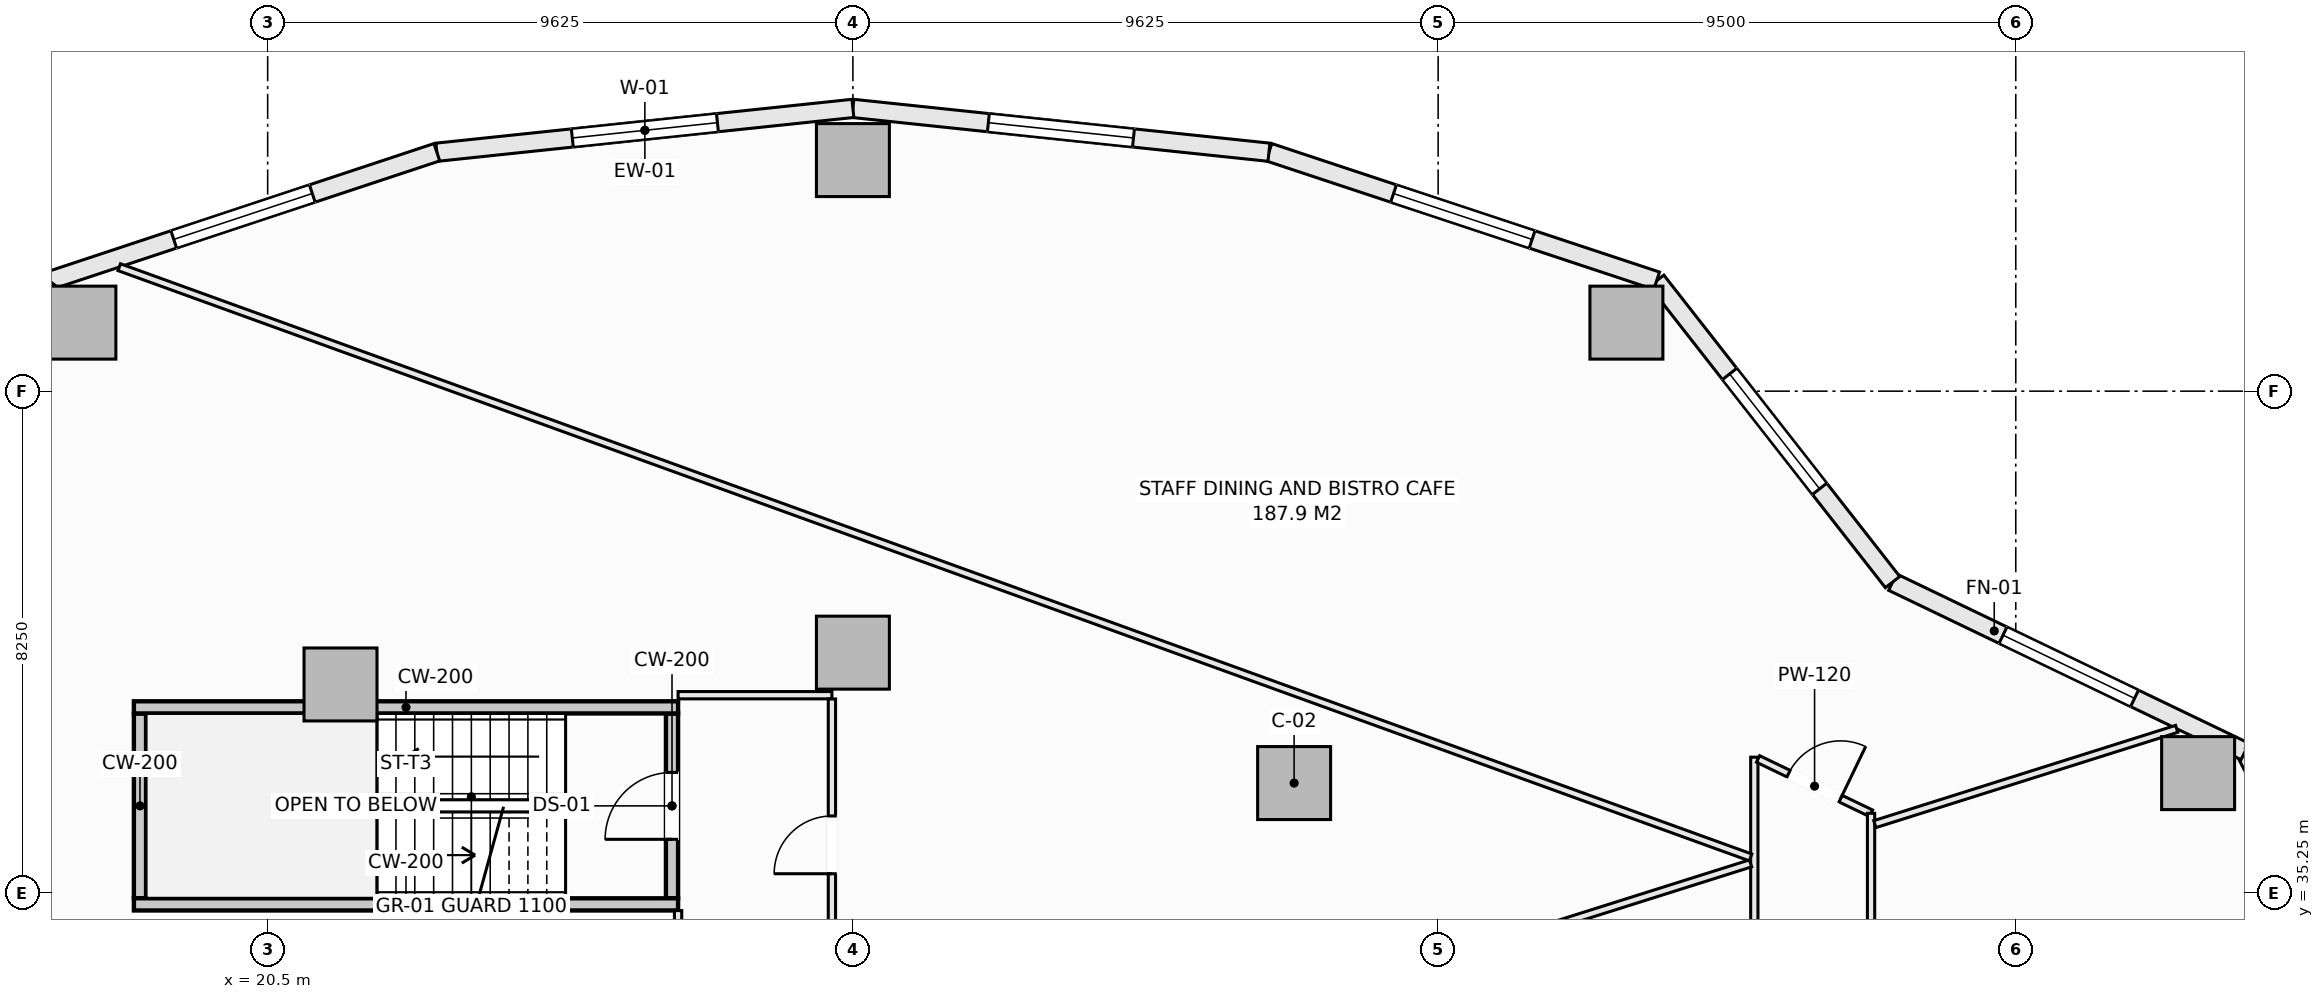
"""IFC4 building model, lengths in metres.
Left out: names, types, materials, properties, quantities, classifications, styles, units other than length and angle.
Written with IfcOpenShell. Run it as: python <this file> out.ifc"""

import sys

from ifc_helpers import new_model, si_unit, direction, frame, frame_2d, origin, origin_2d, place, context, subcontext, project, spatial, rectangle, extrude, element, fill, save


model = new_model("IFC4")
c1 = context("Model", 3, precision=1e-05, world=origin(), true_north=direction((0.0, 1.0)))
c2 = subcontext(c1, "Body", "Model", "MODEL_VIEW")
j1 = project(units=[si_unit("LENGTHUNIT", "METRE"), si_unit("PLANEANGLEUNIT", "RADIAN")], contexts=[c1])
p1 = place(None, origin())
s1 = spatial("IfcSite", under=j1, at=p1, CompositionType="ELEMENT")
p2 = place(p1, origin())
s2 = spatial("IfcBuilding", under=s1, at=p2, CompositionType="ELEMENT")
p3 = place(p2, frame((0.0, 0.0, 80.4)))
s3 = spatial("IfcBuildingStorey", under=s2, at=p3, CompositionType="ELEMENT", Elevation=80.4)
for number, where, z_axis, x_axis in (
    (1, (52.249, 37.219, -0.28), (0.0, 0.0, 1.0), (1.0, 0.0, 0.0)),
    (2, (42.846, 44.627, -0.28), (0.0, 0.0, 1.0), (1.0, 0.0, 0.0)),
    (3, (30.125, 47.3, -0.28), (0.0, 0.0, 1.0), (1.0, 0.0, 0.0)),
    (4, (17.404, 44.627, -0.28), (0.0, 0.0, 1.0), (1.0, 0.0, 0.0)),
    (5, (37.382, 37.055, -0.28), (0.0, 0.0, 1.0), (1.0, 0.0, 0.0)),
    (6, (30.125, 39.2, -0.28), (0.0, 0.0, 1.0), (1.0, 0.0, 0.0)),
    (7, (21.698, 38.677, -0.28), (0.0, 0.0, 1.0), (1.0, 0.0, 0.0)),
):
    element("IfcColumn", number, at=place(p3, frame(where, z_axis=z_axis, x_axis=x_axis)), inside=s3, PredefinedType="COLUMN", context=c2, shape_type="SweptSolid", body=[
        extrude(rectangle(XDim=1.2, YDim=1.2, at=origin_2d()), origin(), (0.0, 0.0, 1.0), 3.85),
    ])
p4 = place(p3, frame((53.021, 37.575, 0.0), z_axis=(0.0, 0.0, 1.0), x_axis=(0.459800981414, -0.888021991558, 0.0)))
e8 = element("IfcWall", 8, at=p4, inside=s3, PredefinedType="SOLIDWALL", context=c2, shape_type="SweptSolid", body=[
    extrude(rectangle(XDim=5.744, YDim=0.3, at=frame_2d((2.872, 0.0))), origin(), (0.0, 0.0, 1.0), 3.093),
])
p5 = place(p4, frame((1.672, 0.0, 0.85)))
e9 = element("IfcOpeningElement", 9, at=p5, cuts=e8, PredefinedType="OPENING", context=c2, shape_type="SweptSolid", body=[
    extrude(rectangle(XDim=2.4, YDim=1.9, at=frame_2d((1.2, 0.95))), frame((0.0, 0.16, 0.0), z_axis=(0.0, -1.0, 0.0), x_axis=(1.0, 0.0, 0.0)), (0.0, 0.0, 1.0), 0.32),
])
p6 = place(p3, frame((47.224, 40.36, 0.0), z_axis=(0.0, 0.0, 1.0), x_axis=(0.901354747727, -0.433081538224, 0.0)))
e10 = element("IfcWall", 10, at=p6, inside=s3, PredefinedType="SOLIDWALL", context=c2, shape_type="SweptSolid", body=[
    extrude(rectangle(XDim=6.431, YDim=0.3, at=frame_2d((3.215, 0.0))), origin(), (0.0, 0.0, 1.0), 3.093),
])
p7 = place(p6, frame((2.015, 0.0, 0.85)))
e11 = element("IfcOpeningElement", 11, at=p7, cuts=e10, PredefinedType="OPENING", context=c2, shape_type="SweptSolid", body=[
    extrude(rectangle(XDim=2.4, YDim=1.9, at=frame_2d((1.2, 0.95))), frame((0.0, 0.16, 0.0), z_axis=(0.0, -1.0, 0.0), x_axis=(1.0, 0.0, 0.0)), (0.0, 0.0, 1.0), 0.32),
])
p8 = place(p3, frame((43.344, 45.316, 0.0), z_axis=(0.0, 0.0, 1.0), x_axis=(0.616434798832, -0.78740595552, 0.0)))
e12 = element("IfcWall", 12, at=p8, inside=s3, PredefinedType="SOLIDWALL", context=c2, shape_type="SweptSolid", body=[
    extrude(rectangle(XDim=6.294, YDim=0.3, at=frame_2d((3.147, 0.0))), origin(), (0.0, 0.0, 1.0), 3.093),
])
p9 = place(p8, frame((1.947, 0.0, 0.85)))
e13 = element("IfcOpeningElement", 13, at=p9, cuts=e12, PredefinedType="OPENING", context=c2, shape_type="SweptSolid", body=[
    extrude(rectangle(XDim=2.4, YDim=1.9, at=frame_2d((1.2, 0.95))), frame((0.0, 0.16, 0.0), z_axis=(0.0, -1.0, 0.0), x_axis=(1.0, 0.0, 0.0)), (0.0, 0.0, 1.0), 0.32),
])
p10 = place(p3, frame((36.968, 47.429, 0.0), z_axis=(0.0, 0.0, 1.0), x_axis=(0.949245153629, -0.314537181127, 0.0)))
e14 = element("IfcWall", 14, at=p10, inside=s3, PredefinedType="SOLIDWALL", context=c2, shape_type="SweptSolid", body=[
    extrude(rectangle(XDim=6.717, YDim=0.3, at=frame_2d((3.358, 0.0))), origin(), (0.0, 0.0, 1.0), 3.093),
])
p11 = place(p10, frame((2.159, 0.0, 0.85)))
e15 = element("IfcOpeningElement", 15, at=p11, cuts=e14, PredefinedType="OPENING", context=c2, shape_type="SweptSolid", body=[
    extrude(rectangle(XDim=2.4, YDim=1.9, at=frame_2d((1.2, 0.95))), frame((0.0, 0.16, 0.0), z_axis=(0.0, -1.0, 0.0), x_axis=(1.0, 0.0, 0.0)), (0.0, 0.0, 1.0), 0.32),
])
p12 = place(p3, frame((30.125, 48.15, 0.0), z_axis=(0.0, 0.0, 1.0), x_axis=(0.994498840295, -0.104747585419, 0.0)))
e16 = element("IfcWall", 16, at=p12, inside=s3, PredefinedType="SOLIDWALL", context=c2, shape_type="SweptSolid", body=[
    extrude(rectangle(XDim=6.88, YDim=0.3, at=frame_2d((3.44, 0.0))), origin(), (0.0, 0.0, 1.0), 3.093),
])
p13 = place(p12, frame((2.24, 0.0, 0.85)))
e17 = element("IfcOpeningElement", 17, at=p13, cuts=e16, PredefinedType="OPENING", context=c2, shape_type="SweptSolid", body=[
    extrude(rectangle(XDim=2.4, YDim=1.9, at=frame_2d((1.2, 0.95))), frame((0.0, 0.16, 0.0), z_axis=(0.0, -1.0, 0.0), x_axis=(1.0, 0.0, 0.0)), (0.0, 0.0, 1.0), 0.32),
])
p14 = place(p3, frame((23.282, 47.429, 0.0), z_axis=(0.0, 0.0, 1.0), x_axis=(0.994498840295, 0.104747585419, 0.0)))
e18 = element("IfcWall", 18, at=p14, inside=s3, PredefinedType="SOLIDWALL", context=c2, shape_type="SweptSolid", body=[
    extrude(rectangle(XDim=6.88, YDim=0.3, at=frame_2d((3.44, 0.0))), origin(), (0.0, 0.0, 1.0), 3.093),
])
p15 = place(p14, frame((2.24, 0.0, 0.85)))
e19 = element("IfcOpeningElement", 19, at=p15, cuts=e18, PredefinedType="OPENING", context=c2, shape_type="SweptSolid", body=[
    extrude(rectangle(XDim=2.4, YDim=1.9, at=frame_2d((1.2, 0.95))), frame((0.0, 0.16, 0.0), z_axis=(0.0, -1.0, 0.0), x_axis=(1.0, 0.0, 0.0)), (0.0, 0.0, 1.0), 0.32),
])
p16 = place(p3, frame((16.906, 45.316, 0.0), z_axis=(0.0, 0.0, 1.0), x_axis=(0.949245153629, 0.314537181127, 0.0)))
e20 = element("IfcWall", 20, at=p16, inside=s3, PredefinedType="SOLIDWALL", context=c2, shape_type="SweptSolid", body=[
    extrude(rectangle(XDim=6.717, YDim=0.3, at=frame_2d((3.358, 0.0))), origin(), (0.0, 0.0, 1.0), 3.093),
])
p17 = place(p16, frame((2.159, 0.0, 0.85)))
e21 = element("IfcOpeningElement", 21, at=p17, cuts=e20, PredefinedType="OPENING", context=c2, shape_type="SweptSolid", body=[
    extrude(rectangle(XDim=2.4, YDim=1.9, at=frame_2d((1.2, 0.95))), frame((0.0, 0.16, 0.0), z_axis=(0.0, -1.0, 0.0), x_axis=(1.0, 0.0, 0.0)), (0.0, 0.0, 1.0), 0.32),
])
p18 = place(p3, frame((13.026, 40.36, 0.0), z_axis=(0.0, 0.0, 1.0), x_axis=(0.616434798832, 0.78740595552, 0.0)))
e22 = element("IfcWall", 22, at=p18, inside=s3, PredefinedType="SOLIDWALL", context=c2, shape_type="SweptSolid", body=[
    extrude(rectangle(XDim=6.294, YDim=0.3, at=frame_2d((3.147, 0.0))), origin(), (0.0, 0.0, 1.0), 3.093),
])
p19 = place(p18, frame((1.947, 0.0, 0.85)))
e23 = element("IfcOpeningElement", 23, at=p19, cuts=e22, PredefinedType="OPENING", context=c2, shape_type="SweptSolid", body=[
    extrude(rectangle(XDim=2.4, YDim=1.9, at=frame_2d((1.2, 0.95))), frame((0.0, 0.16, 0.0), z_axis=(0.0, -1.0, 0.0), x_axis=(1.0, 0.0, 0.0)), (0.0, 0.0, 1.0), 0.32),
])
p20 = place(p3, frame((27.15, 35.16, -0.28), z_axis=(0.0, 0.0, 1.0), x_axis=(0.0, 1.0, 0.0)))
e24 = element("IfcWall", 24, at=p20, inside=s3, PredefinedType="SHEAR", context=c2, shape_type="SweptSolid", body=[
    extrude(rectangle(XDim=3.04, YDim=0.2, at=frame_2d((1.52, 0.0))), origin(), (0.0, 0.0, 1.0), 3.85),
])
p21 = place(p20, frame((0.97, 0.0, 0.28)))
e25 = element("IfcOpeningElement", 25, at=p21, cuts=e24, PredefinedType="OPENING", context=c2, shape_type="SweptSolid", body=[
    extrude(rectangle(XDim=1.1, YDim=2.15, at=frame_2d((0.55, 1.075))), frame((0.0, 0.11, 0.0), z_axis=(0.0, -1.0, 0.0), x_axis=(1.0, 0.0, 0.0)), (0.0, 0.0, 1.0), 0.22),
])
p22 = place(p3, frame((18.4, 35.16, -0.28), z_axis=(0.0, 0.0, 1.0), x_axis=(0.0, 1.0, 0.0)))
e26 = element("IfcWall", 26, at=p22, inside=s3, PredefinedType="SHEAR", context=c2, shape_type="SweptSolid", body=[
    extrude(rectangle(XDim=3.04, YDim=0.2, at=frame_2d((1.52, 0.0))), origin(), (0.0, 0.0, 1.0), 3.85),
])
for number, where, z_axis, x_axis in (
    (27, (18.3, 38.3, -0.28), (0.0, 0.0, 1.0), (1.0, 0.0, 0.0)),
    (28, (18.3, 35.06, -0.28), (0.0, 0.0, 1.0), (1.0, 0.0, 0.0)),
):
    element("IfcWall", number, at=place(p3, frame(where, z_axis=z_axis, x_axis=x_axis)), inside=s3, PredefinedType="SHEAR", context=c2, shape_type="SweptSolid", body=[
        extrude(rectangle(XDim=8.95, YDim=0.2, at=frame_2d((4.475, 0.0))), origin(), (0.0, 0.0, 1.0), 3.85),
    ])
p23 = place(p3, frame((27.25, 34.352, 0.0), z_axis=(0.0, 0.0, 1.0), x_axis=(0.0, 1.0, 0.0)))
e29 = element("IfcWall", 29, at=p23, inside=s3, PredefinedType="PARTITIONING", context=c2, shape_type="SweptSolid", body=[
    extrude(rectangle(XDim=0.606, YDim=0.12, at=frame_2d((0.303, 0.0))), origin(), (0.0, 0.0, 1.0), 3.57),
])
p24 = place(p3, frame((27.25, 38.5, 0.0), z_axis=(0.0, 0.0, 1.0), x_axis=(1.0, 0.0, 0.0)))
e30 = element("IfcWall", 30, at=p24, inside=s3, PredefinedType="PARTITIONING", context=c2, shape_type="SweptSolid", body=[
    extrude(rectangle(XDim=2.53, YDim=0.12, at=frame_2d((1.265, 0.0))), origin(), (0.0, 0.0, 1.0), 3.57),
])
p25 = place(p3, frame((29.78, 33.64, 0.0), z_axis=(0.0, 0.0, 1.0), x_axis=(0.0, 1.0, 0.0)))
e31 = element("IfcWall", 31, at=p25, inside=s3, PredefinedType="PARTITIONING", context=c2, shape_type="SweptSolid", body=[
    extrude(rectangle(XDim=4.798, YDim=0.12, at=frame_2d((2.399, 0.0))), origin(), (0.0, 0.0, 1.0), 3.57),
])
p26 = place(p25, frame((1.924, 0.0, 0.0)))
e32 = element("IfcOpeningElement", 32, at=p26, cuts=e31, PredefinedType="OPENING", context=c2, shape_type="SweptSolid", body=[
    extrude(rectangle(XDim=0.95, YDim=2.1, at=frame_2d((0.475, 1.05))), frame((0.0, 0.07, 0.0), z_axis=(0.0, -1.0, 0.0), x_axis=(1.0, 0.0, 0.0)), (0.0, 0.0, 1.0), 0.14),
])
p27 = place(p3, frame((44.95, 31.182, 0.0), z_axis=(0.0, 0.0, 1.0), x_axis=(0.0, 1.0, 0.0)))
e33 = element("IfcWall", 33, at=p27, inside=s3, PredefinedType="PARTITIONING", context=c2, shape_type="SweptSolid", body=[
    extrude(rectangle(XDim=6.299, YDim=0.12, at=frame_2d((3.149, 0.0))), origin(), (0.0, 0.0, 1.0), 3.57),
])
p28 = place(p3, frame((45.012, 37.451, 0.0), z_axis=(0.0, 0.0, 1.0), x_axis=(0.901304887575, -0.433185294803, 0.0)))
e34 = element("IfcWall", 34, at=p28, inside=s3, PredefinedType="PARTITIONING", context=c2, shape_type="SweptSolid", body=[
    extrude(rectangle(XDim=2.062, YDim=0.12, at=frame_2d((1.031, 0.0))), origin(), (0.0, 0.0, 1.0), 3.57),
])
p29 = place(p28, frame((0.556, 0.0, 0.0)))
e35 = element("IfcOpeningElement", 35, at=p29, cuts=e34, PredefinedType="OPENING", context=c2, shape_type="SweptSolid", body=[
    extrude(rectangle(XDim=0.95, YDim=2.1, at=frame_2d((0.475, 1.05))), frame((0.0, 0.07, 0.0), z_axis=(0.0, -1.0, 0.0), x_axis=(1.0, 0.0, 0.0)), (0.0, 0.0, 1.0), 0.14),
])
p30 = place(p3, frame((46.87, 17.442, 0.0), z_axis=(0.0, 0.0, 1.0), x_axis=(0.0, 1.0, 0.0)))
e36 = element("IfcWall", 36, at=p30, inside=s3, PredefinedType="PARTITIONING", context=c2, shape_type="SweptSolid", body=[
    extrude(rectangle(XDim=19.116, YDim=0.12, at=frame_2d((9.558, 0.0))), origin(), (0.0, 0.0, 1.0), 3.57),
])
p31 = place(p30, frame((11.352, 0.0, 0.0)))
e37 = element("IfcOpeningElement", 37, at=p31, cuts=e36, PredefinedType="OPENING", context=c2, shape_type="SweptSolid", body=[
    extrude(rectangle(XDim=0.95, YDim=2.1, at=frame_2d((0.475, 1.05))), frame((0.0, 0.07, 0.0), z_axis=(0.0, -1.0, 0.0), x_axis=(1.0, 0.0, 0.0)), (0.0, 0.0, 1.0), 0.14),
])
p32 = place(p3, frame((39.02, 33.883, 0.0), z_axis=(0.0, 0.0, 1.0), x_axis=(0.953639615223, 0.300950966568, 0.0)))
e38 = element("IfcWall", 38, at=p32, inside=s3, PredefinedType="PARTITIONING", context=c2, shape_type="SweptSolid", body=[
    extrude(rectangle(XDim=6.153, YDim=0.12, at=frame_2d((3.077, 0.0))), origin(), (0.0, 0.0, 1.0), 3.57),
])
p33 = place(p3, frame((46.932, 36.38, 0.0), z_axis=(0.0, 0.0, 1.0), x_axis=(0.9536443078, 0.300936096541, 0.0)))
e39 = element("IfcWall", 39, at=p33, inside=s3, PredefinedType="PARTITIONING", context=c2, shape_type="SweptSolid", body=[
    extrude(rectangle(XDim=5.206, YDim=0.12, at=frame_2d((2.603, 0.0))), origin(), (0.0, 0.0, 1.0), 3.57),
])
p34 = place(p3, frame((18.06, 45.538, 0.0), z_axis=(0.0, 0.0, 1.0), x_axis=(0.940354559933, -0.340195975304, 0.0)))
e40 = element("IfcWall", 40, at=p34, inside=s3, PredefinedType="PARTITIONING", context=c2, shape_type="SweptSolid", body=[
    extrude(rectangle(XDim=28.53, YDim=0.12, at=frame_2d((14.265, 0.0))), origin(), (0.0, 0.0, 1.0), 3.093),
])
p35 = place(p3, frame((24.626, 34.958, 0.0), z_axis=(0.0, 0.0, 1.0), x_axis=(0.643032873298, -0.765838575588, 0.0)))
e41 = element("IfcWall", 41, at=p35, inside=s3, PredefinedType="PARTITIONING", context=c2, shape_type="SweptSolid", body=[
    extrude(rectangle(XDim=0.791, YDim=0.12, at=frame_2d((0.396, 0.0))), origin(), (0.0, 0.0, 1.0), 3.57),
])
p36 = place(p7, origin())
e42 = element("IfcWindow", 42, at=p36, inside=s3, PartitioningType="SINGLE_PANEL", PredefinedType="WINDOW", context=c2, shape_type="SweptSolid", body=[
    extrude(rectangle(XDim=2.4, YDim=1.9, at=frame_2d((1.2, 0.95))), frame((0.0, 0.03, 0.0), z_axis=(0.0, -1.0, 0.0), x_axis=(1.0, 0.0, 0.0)), (0.0, 0.0, 1.0), 0.06),
])
fill(e11, e42)
p37 = place(p9, origin())
e43 = element("IfcWindow", 43, at=p37, inside=s3, PartitioningType="SINGLE_PANEL", PredefinedType="WINDOW", context=c2, shape_type="SweptSolid", body=[
    extrude(rectangle(XDim=2.4, YDim=1.9, at=frame_2d((1.2, 0.95))), frame((0.0, 0.03, 0.0), z_axis=(0.0, -1.0, 0.0), x_axis=(1.0, 0.0, 0.0)), (0.0, 0.0, 1.0), 0.06),
])
fill(e13, e43)
p38 = place(p11, origin())
e44 = element("IfcWindow", 44, at=p38, inside=s3, PartitioningType="SINGLE_PANEL", PredefinedType="WINDOW", context=c2, shape_type="SweptSolid", body=[
    extrude(rectangle(XDim=2.4, YDim=1.9, at=frame_2d((1.2, 0.95))), frame((0.0, 0.03, 0.0), z_axis=(0.0, -1.0, 0.0), x_axis=(1.0, 0.0, 0.0)), (0.0, 0.0, 1.0), 0.06),
])
fill(e15, e44)
p39 = place(p13, origin())
e45 = element("IfcWindow", 45, at=p39, inside=s3, PartitioningType="SINGLE_PANEL", PredefinedType="WINDOW", context=c2, shape_type="SweptSolid", body=[
    extrude(rectangle(XDim=2.4, YDim=1.9, at=frame_2d((1.2, 0.95))), frame((0.0, 0.03, 0.0), z_axis=(0.0, -1.0, 0.0), x_axis=(1.0, 0.0, 0.0)), (0.0, 0.0, 1.0), 0.06),
])
fill(e17, e45)
p40 = place(p15, origin())
e46 = element("IfcWindow", 46, at=p40, inside=s3, PartitioningType="SINGLE_PANEL", PredefinedType="WINDOW", context=c2, shape_type="SweptSolid", body=[
    extrude(rectangle(XDim=2.4, YDim=1.9, at=frame_2d((1.2, 0.95))), frame((0.0, 0.03, 0.0), z_axis=(0.0, -1.0, 0.0), x_axis=(1.0, 0.0, 0.0)), (0.0, 0.0, 1.0), 0.06),
])
fill(e19, e46)
p41 = place(p17, origin())
e47 = element("IfcWindow", 47, at=p41, inside=s3, PartitioningType="SINGLE_PANEL", PredefinedType="WINDOW", context=c2, shape_type="SweptSolid", body=[
    extrude(rectangle(XDim=2.4, YDim=1.9, at=frame_2d((1.2, 0.95))), frame((0.0, 0.03, 0.0), z_axis=(0.0, -1.0, 0.0), x_axis=(1.0, 0.0, 0.0)), (0.0, 0.0, 1.0), 0.06),
])
fill(e21, e47)
p42 = place(p21, origin())
e48 = element("IfcDoor", 48, at=p42, inside=s3, OperationType="SINGLE_SWING_LEFT", PredefinedType="DOOR", context=c2, shape_type="SweptSolid", body=[
    extrude(rectangle(XDim=1.1, YDim=2.15, at=frame_2d((0.55, 1.075))), frame((0.0, 0.025, 0.0), z_axis=(0.0, -1.0, 0.0), x_axis=(1.0, 0.0, 0.0)), (0.0, 0.0, 1.0), 0.05),
])
fill(e25, e48)
p43 = place(p29, origin())
e49 = element("IfcDoor", 49, at=p43, inside=s3, OperationType="SINGLE_SWING_RIGHT", PredefinedType="DOOR", context=c2, shape_type="SweptSolid", body=[
    extrude(rectangle(XDim=0.95, YDim=2.1, at=frame_2d((0.475, 1.05))), frame((0.0, 0.025, 0.0), z_axis=(0.0, -1.0, 0.0), x_axis=(1.0, 0.0, 0.0)), (0.0, 0.0, 1.0), 0.05),
])
fill(e35, e49)
p44 = place(p26, origin())
e50 = element("IfcDoor", 50, at=p44, inside=s3, OperationType="SINGLE_SWING_LEFT", PredefinedType="DOOR", context=c2, shape_type="SweptSolid", body=[
    extrude(rectangle(XDim=0.95, YDim=2.1, at=frame_2d((0.475, 1.05))), frame((0.0, 0.025, 0.0), z_axis=(0.0, -1.0, 0.0), x_axis=(1.0, 0.0, 0.0)), (0.0, 0.0, 1.0), 0.05),
])
fill(e32, e50)
save(model, sys.argv[1])
